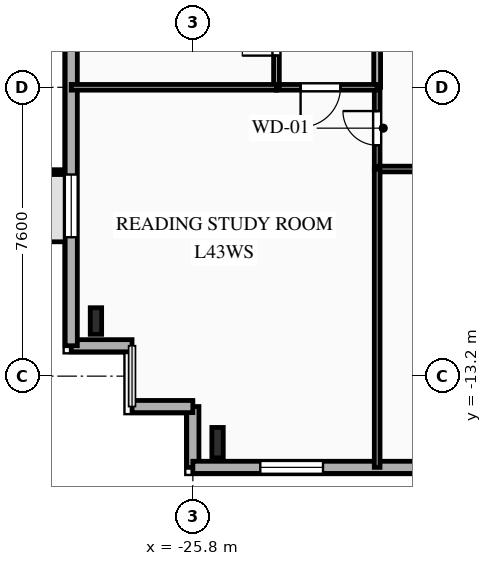
"""IFC4 building model, lengths in metres.
Left out: names, types, materials, properties, quantities, classifications, styles, units other than length and angle.
Written with IfcOpenShell. Run it as: python <this file> out.ifc"""

import sys

from ifc_helpers import new_model, si_unit, direction, frame, frame_2d, origin, origin_2d, place, context, subcontext, project, spatial, rectangle, i_section, extrude, element, fill, save


model = new_model("IFC4")
c1 = context("Model", 3, precision=1e-05, world=origin(), true_north=direction((0.0, 1.0)))
c2 = subcontext(c1, "Body", "Model", "MODEL_VIEW")
j1 = project(units=[si_unit("LENGTHUNIT", "METRE"), si_unit("PLANEANGLEUNIT", "RADIAN")], contexts=[c1])
p1 = place(None, origin())
s1 = spatial("IfcSite", under=j1, at=p1, CompositionType="ELEMENT")
p2 = place(p1, origin())
s2 = spatial("IfcBuilding", under=s1, at=p2, CompositionType="ELEMENT")
p3 = place(p2, frame((0.0, 0.0, 154.45)))
s3 = spatial("IfcBuildingStorey", under=s2, at=p3, CompositionType="ELEMENT", Elevation=154.45)
p4 = place(p3, frame((-25.15, -14.95, 0.0), z_axis=(0.0, 0.0, 1.0), x_axis=(1.0, 0.0, 0.0)))
e1 = element("IfcColumn", 1, at=p4, inside=s3, PredefinedType="COLUMN", context=c2, shape_type="SweptSolid", body=[
    extrude(i_section(OverallWidth=0.3, OverallDepth=0.8, WebThickness=0.018, FlangeThickness=0.033, FilletRadius=0.03, at=origin_2d()), origin(), (0.0, 0.0, 1.0), 3.35),
])
p5 = place(p3, frame((-28.35, -11.75, 0.0), z_axis=(0.0, 0.0, 1.0), x_axis=(1.0, 0.0, 0.0)))
e2 = element("IfcColumn", 2, at=p5, inside=s3, PredefinedType="COLUMN", context=c2, shape_type="SweptSolid", body=[
    extrude(i_section(OverallWidth=0.3, OverallDepth=0.7, WebThickness=0.017, FlangeThickness=0.032, FilletRadius=0.027, at=origin_2d()), origin(), (0.0, 0.0, 1.0), 3.35),
])
p6 = place(p3, frame((-25.8, -15.6, 0.0), z_axis=(0.0, 0.0, 1.0), x_axis=(0.0, 1.0, 0.0)))
e3 = element("IfcWall", 3, at=p6, inside=s3, PredefinedType="SOLIDWALL", context=c2, shape_type="SweptSolid", body=[
    extrude(rectangle(XDim=1.6, YDim=0.32, at=frame_2d((0.8, 0.0))), origin(), (0.0, 0.0, 1.0), 3.04),
])
p7 = place(p3, frame((-25.8, -14.0, 0.0), z_axis=(0.0, 0.0, 1.0), x_axis=(-1.0, 0.0, 0.0)))
e4 = element("IfcWall", 4, at=p7, inside=s3, PredefinedType="SOLIDWALL", context=c2, shape_type="SweptSolid", body=[
    extrude(rectangle(XDim=1.6, YDim=0.32, at=frame_2d((0.8, 0.0))), origin(), (0.0, 0.0, 1.0), 3.04),
])
p8 = place(p3, frame((-27.4, -12.4, 0.0), z_axis=(0.0, 0.0, 1.0), x_axis=(-1.0, 0.0, 0.0)))
e5 = element("IfcWall", 5, at=p8, inside=s3, PredefinedType="SOLIDWALL", context=c2, shape_type="SweptSolid", body=[
    extrude(rectangle(XDim=1.6, YDim=0.32, at=frame_2d((0.8, 0.0))), origin(), (0.0, 0.0, 1.0), 3.04),
])
p9 = place(p3, frame((-29.0, -12.4, 0.0), z_axis=(0.0, 0.0, 1.0), x_axis=(0.0, 1.0, 0.0)))
e6 = element("IfcWall", 6, at=p9, inside=s3, PredefinedType="SOLIDWALL", context=c2, shape_type="SweptSolid", body=[
    extrude(rectangle(XDim=29.6, YDim=0.32, at=frame_2d((14.8, 0.0))), origin(), (0.0, 0.0, 1.0), 3.04),
])
p10 = place(p9, frame((2.855, 0.0, 0.85)))
e7 = element("IfcOpeningElement", 7, at=p10, cuts=e6, PredefinedType="OPENING", context=c2, shape_type="SweptSolid", body=[
    extrude(rectangle(XDim=1.65, YDim=1.85, at=frame_2d((0.825, 0.925))), frame((0.0, 0.17, 0.0), z_axis=(0.0, -1.0, 0.0), x_axis=(1.0, 0.0, 0.0)), (0.0, 0.0, 1.0), 0.34),
])
p11 = place(p9, frame((9.865, 0.0, 0.85)))
e8 = element("IfcOpeningElement", 8, at=p11, cuts=e6, PredefinedType="OPENING", context=c2, shape_type="SweptSolid", body=[
    extrude(rectangle(XDim=1.95, YDim=1.85, at=frame_2d((0.975, 0.925))), frame((0.0, 0.17, 0.0), z_axis=(0.0, -1.0, 0.0), x_axis=(1.0, 0.0, 0.0)), (0.0, 0.0, 1.0), 0.34),
])
p12 = place(p9, frame((13.08, 0.0, 0.85)))
e9 = element("IfcOpeningElement", 9, at=p12, cuts=e6, PredefinedType="OPENING", context=c2, shape_type="SweptSolid", body=[
    extrude(rectangle(XDim=1.6, YDim=1.85, at=frame_2d((0.8, 0.925))), frame((0.0, 0.17, 0.0), z_axis=(0.0, -1.0, 0.0), x_axis=(1.0, 0.0, 0.0)), (0.0, 0.0, 1.0), 0.34),
])
p13 = place(p9, frame((15.88, 0.0, 0.85)))
e10 = element("IfcOpeningElement", 10, at=p13, cuts=e6, PredefinedType="OPENING", context=c2, shape_type="SweptSolid", body=[
    extrude(rectangle(XDim=1.6, YDim=1.85, at=frame_2d((0.8, 0.925))), frame((0.0, 0.17, 0.0), z_axis=(0.0, -1.0, 0.0), x_axis=(1.0, 0.0, 0.0)), (0.0, 0.0, 1.0), 0.34),
])
p14 = place(p9, frame((18.72, 0.0, 0.85)))
e11 = element("IfcOpeningElement", 11, at=p14, cuts=e6, PredefinedType="OPENING", context=c2, shape_type="SweptSolid", body=[
    extrude(rectangle(XDim=1.6, YDim=1.85, at=frame_2d((0.8, 0.925))), frame((0.0, 0.17, 0.0), z_axis=(0.0, -1.0, 0.0), x_axis=(1.0, 0.0, 0.0)), (0.0, 0.0, 1.0), 0.34),
])
p15 = place(p9, frame((24.255, 0.0, 0.85)))
e12 = element("IfcOpeningElement", 12, at=p15, cuts=e6, PredefinedType="OPENING", context=c2, shape_type="SweptSolid", body=[
    extrude(rectangle(XDim=1.65, YDim=1.85, at=frame_2d((0.825, 0.925))), frame((0.0, 0.17, 0.0), z_axis=(0.0, -1.0, 0.0), x_axis=(1.0, 0.0, 0.0)), (0.0, 0.0, 1.0), 0.34),
])
p16 = place(p3, frame((23.8, -15.6, 0.0), z_axis=(0.0, 0.0, 1.0), x_axis=(-1.0, 0.0, 0.0)))
e13 = element("IfcWall", 13, at=p16, inside=s3, PredefinedType="SOLIDWALL", context=c2, shape_type="SweptSolid", body=[
    extrude(rectangle(XDim=49.6, YDim=0.32, at=frame_2d((24.8, 0.0))), origin(), (0.0, 0.0, 1.0), 3.04),
])
p17 = place(p16, frame((1.13, 0.0, 0.85)))
e14 = element("IfcOpeningElement", 14, at=p17, cuts=e13, PredefinedType="OPENING", context=c2, shape_type="SweptSolid", body=[
    extrude(rectangle(XDim=1.1, YDim=1.85, at=frame_2d((0.55, 0.925))), frame((0.0, 0.17, 0.0), z_axis=(0.0, -1.0, 0.0), x_axis=(1.0, 0.0, 0.0)), (0.0, 0.0, 1.0), 0.34),
])
p18 = place(p16, frame((5.055, 0.0, 0.85)))
e15 = element("IfcOpeningElement", 15, at=p18, cuts=e13, PredefinedType="OPENING", context=c2, shape_type="SweptSolid", body=[
    extrude(rectangle(XDim=1.65, YDim=1.85, at=frame_2d((0.825, 0.925))), frame((0.0, 0.17, 0.0), z_axis=(0.0, -1.0, 0.0), x_axis=(1.0, 0.0, 0.0)), (0.0, 0.0, 1.0), 0.34),
])
p19 = place(p16, frame((10.78, 0.0, 0.85)))
e16 = element("IfcOpeningElement", 16, at=p19, cuts=e13, PredefinedType="OPENING", context=c2, shape_type="SweptSolid", body=[
    extrude(rectangle(XDim=2.2, YDim=1.85, at=frame_2d((1.1, 0.925))), frame((0.0, 0.17, 0.0), z_axis=(0.0, -1.0, 0.0), x_axis=(1.0, 0.0, 0.0)), (0.0, 0.0, 1.0), 0.34),
])
p20 = place(p16, frame((17.284, 0.0, 0.85)))
e17 = element("IfcOpeningElement", 17, at=p20, cuts=e13, PredefinedType="OPENING", context=c2, shape_type="SweptSolid", body=[
    extrude(rectangle(XDim=2.2, YDim=1.85, at=frame_2d((1.1, 0.925))), frame((0.0, 0.17, 0.0), z_axis=(0.0, -1.0, 0.0), x_axis=(1.0, 0.0, 0.0)), (0.0, 0.0, 1.0), 0.34),
])
p21 = place(p16, frame((22.248, 0.0, 0.85)))
e18 = element("IfcOpeningElement", 18, at=p21, cuts=e13, PredefinedType="OPENING", context=c2, shape_type="SweptSolid", body=[
    extrude(rectangle(XDim=2.2, YDim=1.85, at=frame_2d((1.1, 0.925))), frame((0.0, 0.17, 0.0), z_axis=(0.0, -1.0, 0.0), x_axis=(1.0, 0.0, 0.0)), (0.0, 0.0, 1.0), 0.34),
])
p22 = place(p16, frame((28.7, 0.0, 0.85)))
e19 = element("IfcOpeningElement", 19, at=p22, cuts=e13, PredefinedType="OPENING", context=c2, shape_type="SweptSolid", body=[
    extrude(rectangle(XDim=2.2, YDim=1.85, at=frame_2d((1.1, 0.925))), frame((0.0, 0.17, 0.0), z_axis=(0.0, -1.0, 0.0), x_axis=(1.0, 0.0, 0.0)), (0.0, 0.0, 1.0), 0.34),
])
p23 = place(p16, frame((34.7, 0.0, 0.85)))
e20 = element("IfcOpeningElement", 20, at=p23, cuts=e13, PredefinedType="OPENING", context=c2, shape_type="SweptSolid", body=[
    extrude(rectangle(XDim=2.2, YDim=1.85, at=frame_2d((1.1, 0.925))), frame((0.0, 0.17, 0.0), z_axis=(0.0, -1.0, 0.0), x_axis=(1.0, 0.0, 0.0)), (0.0, 0.0, 1.0), 0.34),
])
p24 = place(p16, frame((41.492, 0.0, 0.85)))
e21 = element("IfcOpeningElement", 21, at=p24, cuts=e13, PredefinedType="OPENING", context=c2, shape_type="SweptSolid", body=[
    extrude(rectangle(XDim=1.65, YDim=1.85, at=frame_2d((0.825, 0.925))), frame((0.0, 0.17, 0.0), z_axis=(0.0, -1.0, 0.0), x_axis=(1.0, 0.0, 0.0)), (0.0, 0.0, 1.0), 0.34),
])
p25 = place(p16, frame((46.175, 0.0, 0.85)))
e22 = element("IfcOpeningElement", 22, at=p25, cuts=e13, PredefinedType="OPENING", context=c2, shape_type="SweptSolid", body=[
    extrude(rectangle(XDim=1.65, YDim=1.85, at=frame_2d((0.825, 0.925))), frame((0.0, 0.17, 0.0), z_axis=(0.0, -1.0, 0.0), x_axis=(1.0, 0.0, 0.0)), (0.0, 0.0, 1.0), 0.34),
])
p26 = place(p3, frame((-20.95, -7.75, 0.0), z_axis=(0.0, 0.0, 1.0), x_axis=(0.0, 1.0, 0.0)))
e23 = element("IfcWall", 23, at=p26, inside=s3, PredefinedType="PARTITIONING", context=c2, shape_type="SweptSolid", body=[
    extrude(rectangle(XDim=2.15, YDim=0.15, at=frame_2d((1.075, 0.0))), origin(), (0.0, 0.0, 1.0), 3.04),
])
p27 = place(p26, frame((0.625, 0.0, 0.0)))
e24 = element("IfcOpeningElement", 24, at=p27, cuts=e23, PredefinedType="OPENING", context=c2, shape_type="SweptSolid", body=[
    extrude(rectangle(XDim=0.9, YDim=2.1, at=frame_2d((0.45, 1.05))), frame((0.0, 0.085, 0.0), z_axis=(0.0, -1.0, 0.0), x_axis=(1.0, 0.0, 0.0)), (0.0, 0.0, 1.0), 0.17),
])
p28 = place(p3, frame((-14.964, -7.75, 0.0), z_axis=(0.0, 0.0, 1.0), x_axis=(-1.0, 0.0, 0.0)))
e25 = element("IfcWall", 25, at=p28, inside=s3, PredefinedType="PARTITIONING", context=c2, shape_type="SweptSolid", body=[
    extrude(rectangle(XDim=5.986, YDim=0.15, at=frame_2d((2.993, 0.0))), origin(), (0.0, 0.0, 1.0), 3.04),
])
p29 = place(p28, frame((1.052, 0.0, 0.0)))
e26 = element("IfcOpeningElement", 26, at=p29, cuts=e25, PredefinedType="OPENING", context=c2, shape_type="SweptSolid", body=[
    extrude(rectangle(XDim=1.05, YDim=2.15, at=frame_2d((0.525, 1.075))), frame((0.0, 0.085, 0.0), z_axis=(0.0, -1.0, 0.0), x_axis=(1.0, 0.0, 0.0)), (0.0, 0.0, 1.0), 0.17),
])
p30 = place(p3, frame((-20.95, -5.6, 0.0), z_axis=(0.0, 0.0, 1.0), x_axis=(0.0, 1.0, 0.0)))
e27 = element("IfcWall", 27, at=p30, inside=s3, PredefinedType="PARTITIONING", context=c2, shape_type="SweptSolid", body=[
    extrude(rectangle(XDim=14.1, YDim=0.18, at=frame_2d((7.05, 0.0))), origin(), (0.0, 0.0, 1.0), 3.04),
])
p31 = place(p30, frame((5.058, 0.0, 0.0)))
e28 = element("IfcOpeningElement", 28, at=p31, cuts=e27, PredefinedType="OPENING", context=c2, shape_type="SweptSolid", body=[
    extrude(rectangle(XDim=1.0, YDim=2.15, at=frame_2d((0.5, 1.075))), frame((0.0, 0.1, 0.0), z_axis=(0.0, -1.0, 0.0), x_axis=(1.0, 0.0, 0.0)), (0.0, 0.0, 1.0), 0.2),
])
p32 = place(p3, frame((-20.95, -5.6, 0.0), z_axis=(0.0, 0.0, 1.0), x_axis=(-1.0, 0.0, 0.0)))
e29 = element("IfcWall", 29, at=p32, inside=s3, PredefinedType="PARTITIONING", context=c2, shape_type="SweptSolid", body=[
    extrude(rectangle(XDim=2.65, YDim=0.15, at=frame_2d((1.325, 0.0))), origin(), (0.0, 0.0, 1.0), 3.04),
])
p33 = place(p32, frame((0.965, 0.0, 0.0)))
e30 = element("IfcOpeningElement", 30, at=p33, cuts=e29, PredefinedType="OPENING", context=c2, shape_type="SweptSolid", body=[
    extrude(rectangle(XDim=1.05, YDim=2.15, at=frame_2d((0.525, 1.075))), frame((0.0, 0.085, 0.0), z_axis=(0.0, -1.0, 0.0), x_axis=(1.0, 0.0, 0.0)), (0.0, 0.0, 1.0), 0.17),
])
p34 = place(p3, frame((-23.6, -5.6, 0.0), z_axis=(0.0, 0.0, 1.0), x_axis=(0.0, 1.0, 0.0)))
e31 = element("IfcWall", 31, at=p34, inside=s3, PredefinedType="PLUMBINGWALL", context=c2, shape_type="SweptSolid", body=[
    extrude(rectangle(XDim=2.35, YDim=0.15, at=frame_2d((1.175, 0.0))), origin(), (0.0, 0.0, 1.0), 2.695),
])
p35 = place(p34, frame((0.834, 0.0, 0.0)))
e32 = element("IfcOpeningElement", 32, at=p35, cuts=e31, PredefinedType="OPENING", context=c2, shape_type="SweptSolid", body=[
    extrude(rectangle(XDim=0.9, YDim=2.1, at=frame_2d((0.45, 1.05))), frame((0.0, 0.085, 0.0), z_axis=(0.0, -1.0, 0.0), x_axis=(1.0, 0.0, 0.0)), (0.0, 0.0, 1.0), 0.17),
])
p36 = place(p3, frame((-29.0, -5.6, 0.0), z_axis=(0.0, 0.0, 1.0), x_axis=(1.0, 0.0, 0.0)))
e33 = element("IfcWall", 33, at=p36, inside=s3, PredefinedType="PLUMBINGWALL", context=c2, shape_type="SweptSolid", body=[
    extrude(rectangle(XDim=5.4, YDim=0.15, at=frame_2d((2.7, 0.0))), origin(), (0.0, 0.0, 1.0), 3.04),
])
p37 = place(p3, frame((-20.95, -7.75, 0.0), z_axis=(0.0, 0.0, 1.0), x_axis=(0.0, -1.0, 0.0)))
e34 = element("IfcWall", 34, at=p37, inside=s3, PredefinedType="PARTITIONING", context=c2, shape_type="SweptSolid", body=[
    extrude(rectangle(XDim=7.85, YDim=0.15, at=frame_2d((3.925, 0.0))), origin(), (0.0, 0.0, 1.0), 3.04),
])
p38 = place(p10, origin())
e35 = element("IfcWindow", 35, at=p38, inside=s3, PartitioningType="SINGLE_PANEL", PredefinedType="WINDOW", context=c2, shape_type="SweptSolid", body=[
    extrude(rectangle(XDim=1.65, YDim=1.85, at=frame_2d((0.825, 0.925))), frame((0.0, 0.03, 0.0), z_axis=(0.0, -1.0, 0.0), x_axis=(1.0, 0.0, 0.0)), (0.0, 0.0, 1.0), 0.06),
])
fill(e7, e35)
p39 = place(p25, origin())
e36 = element("IfcWindow", 36, at=p39, inside=s3, PartitioningType="SINGLE_PANEL", PredefinedType="WINDOW", context=c2, shape_type="SweptSolid", body=[
    extrude(rectangle(XDim=1.65, YDim=1.85, at=frame_2d((0.825, 0.925))), frame((0.0, 0.03, 0.0), z_axis=(0.0, -1.0, 0.0), x_axis=(1.0, 0.0, 0.0)), (0.0, 0.0, 1.0), 0.06),
])
fill(e22, e36)
p40 = place(p27, origin())
e37 = element("IfcDoor", 37, at=p40, inside=s3, OperationType="SINGLE_SWING_RIGHT", PredefinedType="DOOR", context=c2, shape_type="SweptSolid", body=[
    extrude(rectangle(XDim=0.9, YDim=2.1, at=frame_2d((0.45, 1.05))), frame((0.0, 0.025, 0.0), z_axis=(0.0, -1.0, 0.0), x_axis=(1.0, 0.0, 0.0)), (0.0, 0.0, 1.0), 0.05),
])
fill(e24, e37)
p41 = place(p33, origin())
e38 = element("IfcDoor", 38, at=p41, inside=s3, OperationType="SINGLE_SWING_RIGHT", PredefinedType="DOOR", context=c2, shape_type="SweptSolid", body=[
    extrude(rectangle(XDim=1.05, YDim=2.15, at=frame_2d((0.525, 1.075))), frame((0.0, 0.025, 0.0), z_axis=(0.0, -1.0, 0.0), x_axis=(1.0, 0.0, 0.0)), (0.0, 0.0, 1.0), 0.05),
])
fill(e30, e38)
p42 = place(p35, origin())
e39 = element("IfcDoor", 39, at=p42, inside=s3, OperationType="SINGLE_SWING_LEFT", PredefinedType="DOOR", context=c2, shape_type="SweptSolid", body=[
    extrude(rectangle(XDim=0.9, YDim=2.1, at=frame_2d((0.45, 1.05))), frame((0.0, 0.025, 0.0), z_axis=(0.0, -1.0, 0.0), x_axis=(1.0, 0.0, 0.0)), (0.0, 0.0, 1.0), 0.05),
])
fill(e32, e39)
save(model, sys.argv[1])
